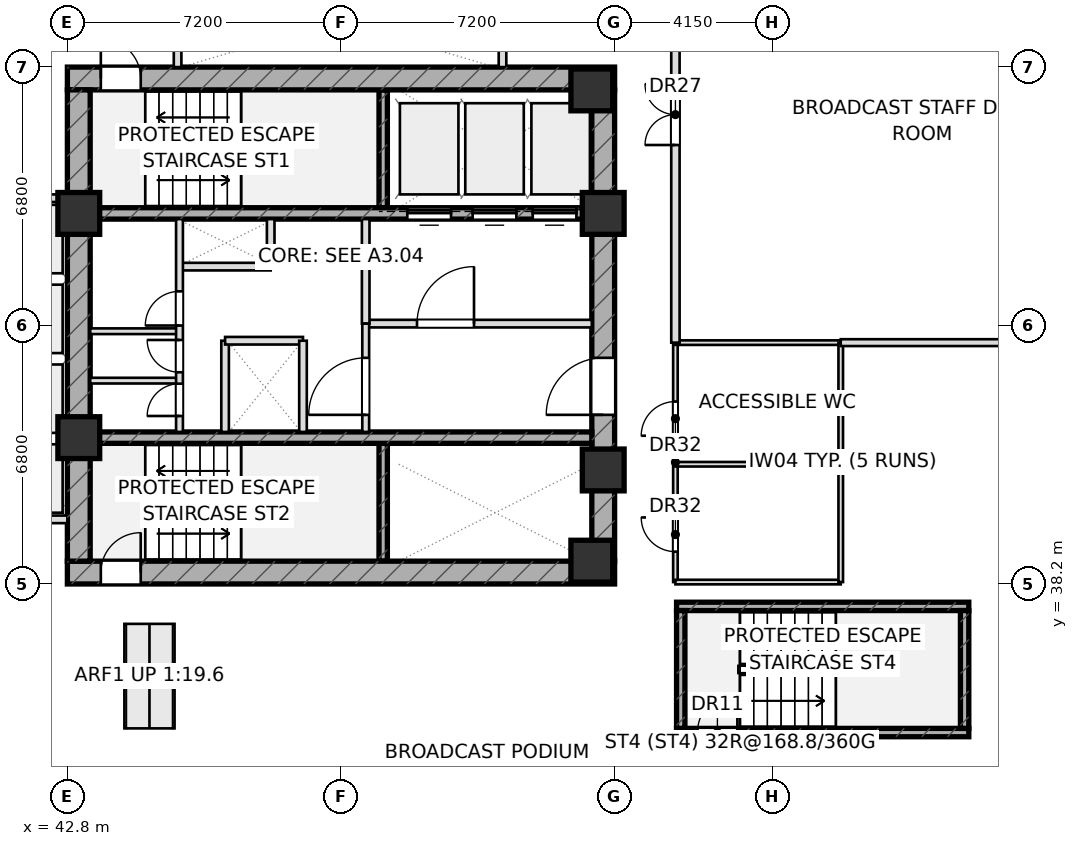
"""IFC4 building model, lengths in metres.
Left out: names, types, materials, properties, quantities, classifications, styles, units other than length and angle.
Written with IfcOpenShell. Run it as: python <this file> out.ifc"""

import sys

from ifc_helpers import new_model, si_unit, direction, frame, frame_2d, origin, origin_2d, place, context, subcontext, project, spatial, rectangle, extrude, element, fill, save


model = new_model("IFC4")
c1 = context("Model", 3, precision=1e-05, world=origin(), true_north=direction((0.0, 1.0)))
c2 = subcontext(c1, "Body", "Model", "MODEL_VIEW")
j1 = project(units=[si_unit("LENGTHUNIT", "METRE"), si_unit("PLANEANGLEUNIT", "RADIAN")], contexts=[c1])
p1 = place(None, origin())
s1 = spatial("IfcSite", under=j1, at=p1, CompositionType="ELEMENT")
p2 = place(p1, origin())
s2 = spatial("IfcBuilding", under=s1, at=p2, CompositionType="ELEMENT")
p3 = place(p2, frame((0.0, 0.0, 16.8)))
s3 = spatial("IfcBuildingStorey", under=s2, at=p3, CompositionType="ELEMENT", Elevation=16.8)
for number, where, z_axis, x_axis in (
    (1, (51.11, 48.1, 0.0), (0.0, 0.0, 1.0), (0.0, 1.0, 0.0)),
    (2, (51.11, 38.8, 0.0), (0.0, 0.0, 1.0), (0.0, 1.0, 0.0)),
):
    element("IfcWall", number, at=place(p3, frame(where, z_axis=z_axis, x_axis=x_axis)), inside=s3, PredefinedType="SHEAR", context=c2, shape_type="SweptSolid", body=[
        extrude(rectangle(XDim=3.1, YDim=0.22, at=frame_2d((1.55, 0.0))), origin(), (0.0, 0.0, 1.0), 4.95),
    ])
p4 = place(p3, frame((58.83, 34.29, 0.0), z_axis=(0.0, 0.0, 1.0), x_axis=(1.0, 0.0, 0.0)))
e3 = element("IfcWall", 3, at=p4, inside=s3, PredefinedType="SHEAR", context=c2, shape_type="SweptSolid", body=[
    extrude(rectangle(XDim=7.69, YDim=0.22, at=frame_2d((3.845, 0.0))), origin(), (0.0, 0.0, 1.0), 4.95),
])
p5 = place(p4, frame((0.55, 0.0, 0.0)))
e4 = element("IfcOpeningElement", 4, at=p5, cuts=e3, PredefinedType="OPENING", context=c2, shape_type="SweptSolid", body=[
    extrude(rectangle(XDim=1.05, YDim=2.2, at=frame_2d((0.525, 1.1))), frame((0.0, 0.12, 0.0), z_axis=(0.0, -1.0, 0.0), x_axis=(1.0, 0.0, 0.0)), (0.0, 0.0, 1.0), 0.24),
])
p6 = place(p3, frame((58.83, 37.61, 0.0), z_axis=(0.0, 0.0, 1.0), x_axis=(1.0, 0.0, 0.0)))
e5 = element("IfcWall", 5, at=p6, inside=s3, PredefinedType="SHEAR", context=c2, shape_type="SweptSolid", body=[
    extrude(rectangle(XDim=7.69, YDim=0.22, at=frame_2d((3.845, 0.0))), origin(), (0.0, 0.0, 1.0), 4.95),
])
for number, where, z_axis, x_axis in (
    (6, (66.41, 34.4, 0.0), (0.0, 0.0, 1.0), (0.0, 1.0, 0.0)),
    (7, (58.94, 34.4, 0.0), (0.0, 0.0, 1.0), (0.0, 1.0, 0.0)),
):
    element("IfcWall", number, at=place(p3, frame(where, z_axis=z_axis, x_axis=x_axis)), inside=s3, PredefinedType="SHEAR", context=c2, shape_type="SweptSolid", body=[
        extrude(rectangle(XDim=3.1, YDim=0.22, at=frame_2d((1.55, 0.0))), origin(), (0.0, 0.0, 1.0), 4.95),
    ])
p7 = place(p3, frame((42.8, 51.5, 0.0), z_axis=(0.0, 0.0, 1.0), x_axis=(1.0, 0.0, 0.0)))
e8 = element("IfcWall", 8, at=p7, inside=s3, PredefinedType="SHEAR", context=c2, shape_type="SweptSolid", body=[
    extrude(rectangle(XDim=14.4, YDim=0.6, at=frame_2d((7.2, 0.0))), origin(), (0.0, 0.0, 1.0), 4.95),
])
p8 = place(p7, frame((0.88, 0.0, 0.0)))
e9 = element("IfcOpeningElement", 9, at=p8, cuts=e8, PredefinedType="OPENING", context=c2, shape_type="SweptSolid", body=[
    extrude(rectangle(XDim=1.05, YDim=2.2, at=frame_2d((0.525, 1.1))), frame((0.0, 0.31, 0.0), z_axis=(0.0, -1.0, 0.0), x_axis=(1.0, 0.0, 0.0)), (0.0, 0.0, 1.0), 0.62),
])
p9 = place(p3, frame((42.8, 38.5, 0.0), z_axis=(0.0, 0.0, 1.0), x_axis=(1.0, 0.0, 0.0)))
e10 = element("IfcWall", 10, at=p9, inside=s3, PredefinedType="SHEAR", context=c2, shape_type="SweptSolid", body=[
    extrude(rectangle(XDim=14.4, YDim=0.6, at=frame_2d((7.2, 0.0))), origin(), (0.0, 0.0, 1.0), 4.95),
])
p10 = place(p9, frame((0.88, 0.0, 0.0)))
e11 = element("IfcOpeningElement", 11, at=p10, cuts=e10, PredefinedType="OPENING", context=c2, shape_type="SweptSolid", body=[
    extrude(rectangle(XDim=1.05, YDim=2.2, at=frame_2d((0.525, 1.1))), frame((0.0, 0.31, 0.0), z_axis=(0.0, -1.0, 0.0), x_axis=(1.0, 0.0, 0.0)), (0.0, 0.0, 1.0), 0.62),
])
p11 = place(p3, frame((43.1, 38.8, 0.0), z_axis=(0.0, 0.0, 1.0), x_axis=(0.0, 1.0, 0.0)))
e12 = element("IfcWall", 12, at=p11, inside=s3, PredefinedType="SHEAR", context=c2, shape_type="SweptSolid", body=[
    extrude(rectangle(XDim=12.4, YDim=0.6, at=frame_2d((6.2, 0.0))), origin(), (0.0, 0.0, 1.0), 4.95),
])
p12 = place(p3, frame((56.9, 38.8, 0.0), z_axis=(0.0, 0.0, 1.0), x_axis=(0.0, 1.0, 0.0)))
e13 = element("IfcWall", 13, at=p12, inside=s3, PredefinedType="SHEAR", context=c2, shape_type="SweptSolid", body=[
    extrude(rectangle(XDim=12.4, YDim=0.6, at=frame_2d((6.2, 0.0))), origin(), (0.0, 0.0, 1.0), 4.95),
])
p13 = place(p12, frame((3.85, 0.0, 0.0)))
e14 = element("IfcOpeningElement", 14, at=p13, cuts=e13, PredefinedType="OPENING", context=c2, shape_type="SweptSolid", body=[
    extrude(rectangle(XDim=1.5, YDim=2.2, at=frame_2d((0.75, 1.1))), frame((0.0, 0.31, 0.0), z_axis=(0.0, -1.0, 0.0), x_axis=(1.0, 0.0, 0.0)), (0.0, 0.0, 1.0), 0.62),
])
p14 = place(p3, frame((43.4, 47.95, 0.0), z_axis=(0.0, 0.0, 1.0), x_axis=(1.0, 0.0, 0.0)))
e15 = element("IfcWall", 15, at=p14, inside=s3, PredefinedType="SHEAR", context=c2, shape_type="SweptSolid", body=[
    extrude(rectangle(XDim=13.2, YDim=0.3, at=frame_2d((6.6, 0.0))), origin(), (0.0, 0.0, 1.0), 4.95),
])
p15 = place(p14, frame((8.345, 0.0, 0.0)))
e16 = element("IfcOpeningElement", 16, at=p15, cuts=e15, PredefinedType="OPENING", context=c2, shape_type="SweptSolid", body=[
    extrude(rectangle(XDim=1.15, YDim=2.2, at=frame_2d((0.575, 1.1))), frame((0.0, 0.16, 0.0), z_axis=(0.0, -1.0, 0.0), x_axis=(1.0, 0.0, 0.0)), (0.0, 0.0, 1.0), 0.32),
])
p16 = place(p14, frame((10.065, 0.0, 0.0)))
e17 = element("IfcOpeningElement", 17, at=p16, cuts=e15, PredefinedType="OPENING", context=c2, shape_type="SweptSolid", body=[
    extrude(rectangle(XDim=1.15, YDim=2.2, at=frame_2d((0.575, 1.1))), frame((0.0, 0.16, 0.0), z_axis=(0.0, -1.0, 0.0), x_axis=(1.0, 0.0, 0.0)), (0.0, 0.0, 1.0), 0.32),
])
p17 = place(p14, frame((11.645, 0.0, 0.0)))
e18 = element("IfcOpeningElement", 18, at=p17, cuts=e15, PredefinedType="OPENING", context=c2, shape_type="SweptSolid", body=[
    extrude(rectangle(XDim=1.15, YDim=2.2, at=frame_2d((0.575, 1.1))), frame((0.0, 0.16, 0.0), z_axis=(0.0, -1.0, 0.0), x_axis=(1.0, 0.0, 0.0)), (0.0, 0.0, 1.0), 0.32),
])
p18 = place(p3, frame((43.4, 42.05, 0.0), z_axis=(0.0, 0.0, 1.0), x_axis=(1.0, 0.0, 0.0)))
e19 = element("IfcWall", 19, at=p18, inside=s3, PredefinedType="SHEAR", context=c2, shape_type="SweptSolid", body=[
    extrude(rectangle(XDim=13.2, YDim=0.3, at=frame_2d((6.6, 0.0))), origin(), (0.0, 0.0, 1.0), 4.95),
])
for number, where, z_axis, x_axis in (
    (20, (43.1, 47.95, 0.0), (0.0, 0.0, 1.0), (1.0, 0.0, 0.0)),
    (21, (56.9, 47.95, 0.0), (0.0, 0.0, 1.0), (1.0, 0.0, 0.0)),
    (22, (56.6, 51.2, 0.0), (0.0, 0.0, 1.0), (1.0, 0.0, 0.0)),
    (23, (43.1, 42.05, 0.0), (0.0, 0.0, 1.0), (1.0, 0.0, 0.0)),
    (24, (56.9, 41.2, 0.0), (0.0, 0.0, 1.0), (1.0, 0.0, 0.0)),
    (25, (56.6, 38.8, 0.0), (0.0, 0.0, 1.0), (1.0, 0.0, 0.0)),
):
    element("IfcColumn", number, at=place(p3, frame(where, z_axis=z_axis, x_axis=x_axis)), inside=s3, PredefinedType="COLUMN", context=c2, shape_type="SweptSolid", body=[
        extrude(rectangle(XDim=1.1, YDim=1.1, at=origin_2d()), origin(), (0.0, 0.0, 1.0), 4.95),
    ])
for number, where, z_axis, x_axis in (
    (26, (40.3, 39.9, 0.0), (0.0, 0.0, 1.0), (1.0, 0.0, 0.0)),
    (27, (40.3, 48.35, 0.0), (0.0, 0.0, 1.0), (1.0, 0.0, 0.0)),
    (28, (45.7, 51.8, 0.0), (0.0, 0.0, 1.0), (0.0, 1.0, 0.0)),
    (29, (54.25, 51.8, 0.0), (0.0, 0.0, 1.0), (0.0, 1.0, 0.0)),
):
    element("IfcWall", number, at=place(p3, frame(where, z_axis=z_axis, x_axis=x_axis)), inside=s3, PredefinedType="PARTITIONING", context=c2, shape_type="SweptSolid", body=[
        extrude(rectangle(XDim=2.5, YDim=0.2, at=frame_2d((1.25, 0.0))), origin(), (0.0, 0.0, 1.0), 4.95),
    ])
p19 = place(p3, frame((45.75, 46.55, 0.0), z_axis=(0.0, 0.0, 1.0), x_axis=(1.0, 0.0, 0.0)))
e30 = element("IfcWall", 30, at=p19, inside=s3, PredefinedType="PARTITIONING", context=c2, shape_type="SweptSolid", body=[
    extrude(rectangle(XDim=2.4, YDim=0.2, at=frame_2d((1.2, 0.0))), origin(), (0.0, 0.0, 1.0), 4.95),
])
p20 = place(p3, frame((48.15, 46.55, 0.0), z_axis=(0.0, 0.0, 1.0), x_axis=(0.0, 1.0, 0.0)))
e31 = element("IfcWall", 31, at=p20, inside=s3, PredefinedType="PARTITIONING", context=c2, shape_type="SweptSolid", body=[
    extrude(rectangle(XDim=1.25, YDim=0.2, at=frame_2d((0.625, 0.0))), origin(), (0.0, 0.0, 1.0), 4.95),
])
p21 = place(p3, frame((46.95, 42.2, 0.0), z_axis=(0.0, 0.0, 1.0), x_axis=(0.0, 1.0, 0.0)))
e32 = element("IfcWall", 32, at=p21, inside=s3, PredefinedType="PARTITIONING", context=c2, shape_type="SweptSolid", body=[
    extrude(rectangle(XDim=2.4, YDim=0.2, at=frame_2d((1.2, 0.0))), origin(), (0.0, 0.0, 1.0), 4.95),
])
p22 = place(p3, frame((46.95, 44.6, 0.0), z_axis=(0.0, 0.0, 1.0), x_axis=(1.0, 0.0, 0.0)))
e33 = element("IfcWall", 33, at=p22, inside=s3, PredefinedType="PARTITIONING", context=c2, shape_type="SweptSolid", body=[
    extrude(rectangle(XDim=2.05, YDim=0.2, at=frame_2d((1.025, 0.0))), origin(), (0.0, 0.0, 1.0), 4.95),
])
p23 = place(p3, frame((50.65, 45.05, 0.0), z_axis=(0.0, 0.0, 1.0), x_axis=(1.0, 0.0, 0.0)))
e34 = element("IfcWall", 34, at=p23, inside=s3, PredefinedType="PARTITIONING", context=c2, shape_type="SweptSolid", body=[
    extrude(rectangle(XDim=5.95, YDim=0.2, at=frame_2d((2.975, 0.0))), origin(), (0.0, 0.0, 1.0), 4.95),
])
p24 = place(p23, frame((1.35, 0.0, 0.0)))
e35 = element("IfcOpeningElement", 35, at=p24, cuts=e34, PredefinedType="OPENING", context=c2, shape_type="SweptSolid", body=[
    extrude(rectangle(XDim=1.5, YDim=2.2, at=frame_2d((0.75, 1.1))), frame((0.0, 0.11, 0.0), z_axis=(0.0, -1.0, 0.0), x_axis=(1.0, 0.0, 0.0)), (0.0, 0.0, 1.0), 0.22),
])
p25 = place(p3, frame((50.65, 45.05, 0.0), z_axis=(0.0, 0.0, 1.0), x_axis=(0.0, 1.0, 0.0)))
e36 = element("IfcWall", 36, at=p25, inside=s3, PredefinedType="PARTITIONING", context=c2, shape_type="SweptSolid", body=[
    extrude(rectangle(XDim=2.75, YDim=0.2, at=frame_2d((1.375, 0.0))), origin(), (0.0, 0.0, 1.0), 4.95),
])
p26 = place(p3, frame((50.65, 42.2, 0.0), z_axis=(0.0, 0.0, 1.0), x_axis=(0.0, 1.0, 0.0)))
e37 = element("IfcWall", 37, at=p26, inside=s3, PredefinedType="PARTITIONING", context=c2, shape_type="SweptSolid", body=[
    extrude(rectangle(XDim=2.85, YDim=0.18, at=frame_2d((1.425, 0.0))), origin(), (0.0, 0.0, 1.0), 4.95),
])
p27 = place(p26, frame((0.45, 0.0, 0.0)))
e38 = element("IfcOpeningElement", 38, at=p27, cuts=e37, PredefinedType="OPENING", context=c2, shape_type="SweptSolid", body=[
    extrude(rectangle(XDim=1.5, YDim=2.2, at=frame_2d((0.75, 1.1))), frame((0.0, 0.1, 0.0), z_axis=(0.0, -1.0, 0.0), x_axis=(1.0, 0.0, 0.0)), (0.0, 0.0, 1.0), 0.2),
])
for number, where, z_axis, x_axis in (
    (39, (43.4, 43.55, 0.0), (0.0, 0.0, 1.0), (1.0, 0.0, 0.0)),
    (40, (43.4, 44.85, 0.0), (0.0, 0.0, 1.0), (1.0, 0.0, 0.0)),
):
    element("IfcWall", number, at=place(p3, frame(where, z_axis=z_axis, x_axis=x_axis)), inside=s3, PredefinedType="PARTITIONING", context=c2, shape_type="SweptSolid", body=[
        extrude(rectangle(XDim=2.35, YDim=0.15, at=frame_2d((1.175, 0.0))), origin(), (0.0, 0.0, 1.0), 4.95),
    ])
p28 = place(p3, frame((45.75, 42.2, 0.0), z_axis=(0.0, 0.0, 1.0), x_axis=(0.0, 1.0, 0.0)))
e41 = element("IfcWall", 41, at=p28, inside=s3, PredefinedType="PARTITIONING", context=c2, shape_type="SweptSolid", body=[
    extrude(rectangle(XDim=5.6, YDim=0.18, at=frame_2d((2.8, 0.0))), origin(), (0.0, 0.0, 1.0), 4.95),
])
p29 = place(p28, frame((0.42, 0.0, 0.0)))
e42 = element("IfcOpeningElement", 42, at=p29, cuts=e41, PredefinedType="OPENING", context=c2, shape_type="SweptSolid", body=[
    extrude(rectangle(XDim=0.85, YDim=2.05, at=frame_2d((0.425, 1.025))), frame((0.0, 0.1, 0.0), z_axis=(0.0, -1.0, 0.0), x_axis=(1.0, 0.0, 0.0)), (0.0, 0.0, 1.0), 0.2),
])
p30 = place(p28, frame((1.57, 0.0, 0.0)))
e43 = element("IfcOpeningElement", 43, at=p30, cuts=e41, PredefinedType="OPENING", context=c2, shape_type="SweptSolid", body=[
    extrude(rectangle(XDim=0.85, YDim=2.05, at=frame_2d((0.425, 1.025))), frame((0.0, 0.1, 0.0), z_axis=(0.0, -1.0, 0.0), x_axis=(1.0, 0.0, 0.0)), (0.0, 0.0, 1.0), 0.2),
])
p31 = place(p28, frame((2.8, 0.0, 0.0)))
e44 = element("IfcOpeningElement", 44, at=p31, cuts=e41, PredefinedType="OPENING", context=c2, shape_type="SweptSolid", body=[
    extrude(rectangle(XDim=0.9, YDim=2.05, at=frame_2d((0.45, 1.025))), frame((0.0, 0.1, 0.0), z_axis=(0.0, -1.0, 0.0), x_axis=(1.0, 0.0, 0.0)), (0.0, 0.0, 1.0), 0.2),
])
p32 = place(p3, frame((58.8, 38.25, 0.0), z_axis=(0.0, 0.0, 1.0), x_axis=(0.0, 1.0, 0.0)))
e45 = element("IfcWall", 45, at=p32, inside=s3, PredefinedType="PARTITIONING", context=c2, shape_type="SweptSolid", body=[
    extrude(rectangle(XDim=6.3, YDim=0.12, at=frame_2d((3.15, 0.0))), origin(), (0.0, 0.0, 1.0), 4.95),
])
p33 = place(p32, frame((0.8, 0.0, 0.0)))
e46 = element("IfcOpeningElement", 46, at=p33, cuts=e45, PredefinedType="OPENING", context=c2, shape_type="SweptSolid", body=[
    extrude(rectangle(XDim=0.9, YDim=2.05, at=frame_2d((0.45, 1.025))), frame((0.0, 0.07, 0.0), z_axis=(0.0, -1.0, 0.0), x_axis=(1.0, 0.0, 0.0)), (0.0, 0.0, 1.0), 0.14),
])
p34 = place(p32, frame((3.85, 0.0, 0.0)))
e47 = element("IfcOpeningElement", 47, at=p34, cuts=e45, PredefinedType="OPENING", context=c2, shape_type="SweptSolid", body=[
    extrude(rectangle(XDim=0.9, YDim=2.05, at=frame_2d((0.45, 1.025))), frame((0.0, 0.07, 0.0), z_axis=(0.0, -1.0, 0.0), x_axis=(1.0, 0.0, 0.0)), (0.0, 0.0, 1.0), 0.14),
])
for number, where, z_axis, x_axis in (
    (48, (58.8, 38.25, 0.0), (0.0, 0.0, 1.0), (1.0, 0.0, 0.0)),
    (49, (58.8, 41.35, 0.0), (0.0, 0.0, 1.0), (1.0, 0.0, 0.0)),
    (50, (58.8, 44.55, 0.0), (0.0, 0.0, 1.0), (1.0, 0.0, 0.0)),
):
    element("IfcWall", number, at=place(p3, frame(where, z_axis=z_axis, x_axis=x_axis)), inside=s3, PredefinedType="PARTITIONING", context=c2, shape_type="SweptSolid", body=[
        extrude(rectangle(XDim=4.35, YDim=0.12, at=frame_2d((2.175, 0.0))), origin(), (0.0, 0.0, 1.0), 4.95),
    ])
p35 = place(p3, frame((63.15, 38.25, 0.0), z_axis=(0.0, 0.0, 1.0), x_axis=(0.0, 1.0, 0.0)))
e51 = element("IfcWall", 51, at=p35, inside=s3, PredefinedType="PARTITIONING", context=c2, shape_type="SweptSolid", body=[
    extrude(rectangle(XDim=6.3, YDim=0.12, at=frame_2d((3.15, 0.0))), origin(), (0.0, 0.0, 1.0), 4.95),
])
p36 = place(p3, frame((58.8, 44.55, 0.0), z_axis=(0.0, 0.0, 1.0), x_axis=(0.0, 1.0, 0.0)))
e52 = element("IfcWall", 52, at=p36, inside=s3, PredefinedType="PARTITIONING", context=c2, shape_type="SweptSolid", body=[
    extrude(rectangle(XDim=11.55, YDim=0.22, at=frame_2d((5.775, 0.0))), origin(), (0.0, 0.0, 1.0), 4.025),
])
p37 = place(p36, frame((5.2, 0.0, 0.0)))
e53 = element("IfcOpeningElement", 53, at=p37, cuts=e52, PredefinedType="OPENING", context=c2, shape_type="SweptSolid", body=[
    extrude(rectangle(XDim=1.6, YDim=2.3, at=frame_2d((0.8, 1.15))), frame((0.0, 0.12, 0.0), z_axis=(0.0, -1.0, 0.0), x_axis=(1.0, 0.0, 0.0)), (0.0, 0.0, 1.0), 0.24),
])
p38 = place(p3, frame((63.15, 44.55, 0.0), z_axis=(0.0, 0.0, 1.0), x_axis=(1.0, 0.0, 0.0)))
e54 = element("IfcWall", 54, at=p38, inside=s3, PredefinedType="PARTITIONING", context=c2, shape_type="SweptSolid", body=[
    extrude(rectangle(XDim=15.33, YDim=0.18, at=frame_2d((7.665, 0.0))), origin(), (0.0, 0.0, 1.0), 4.95),
])
p39 = place(p3, frame((49.0, 42.2, 0.0), z_axis=(0.0, 0.0, 1.0), x_axis=(0.0, 1.0, 0.0)))
e55 = element("IfcWall", 55, at=p39, inside=s3, PredefinedType="PARTITIONING", context=c2, shape_type="SweptSolid", body=[
    extrude(rectangle(XDim=2.4, YDim=0.2, at=frame_2d((1.2, 0.0))), origin(), (0.0, 0.0, 1.0), 4.95),
])
p40 = place(p8, origin())
e56 = element("IfcDoor", 56, at=p40, inside=s3, OperationType="SINGLE_SWING_LEFT", PredefinedType="DOOR", context=c2, shape_type="SweptSolid", body=[
    extrude(rectangle(XDim=1.05, YDim=2.2, at=frame_2d((0.525, 1.1))), frame((0.0, 0.025, 0.0), z_axis=(0.0, -1.0, 0.0), x_axis=(1.0, 0.0, 0.0)), (0.0, 0.0, 1.0), 0.05),
])
fill(e9, e56)
p41 = place(p10, origin())
e57 = element("IfcDoor", 57, at=p41, inside=s3, OperationType="SINGLE_SWING_RIGHT", PredefinedType="DOOR", context=c2, shape_type="SweptSolid", body=[
    extrude(rectangle(XDim=1.05, YDim=2.2, at=frame_2d((0.525, 1.1))), frame((0.0, 0.025, 0.0), z_axis=(0.0, -1.0, 0.0), x_axis=(1.0, 0.0, 0.0)), (0.0, 0.0, 1.0), 0.05),
])
fill(e11, e57)
p42 = place(p13, origin())
e58 = element("IfcDoor", 58, at=p42, inside=s3, OperationType="SINGLE_SWING_LEFT", PredefinedType="DOOR", context=c2, shape_type="SweptSolid", body=[
    extrude(rectangle(XDim=1.5, YDim=2.2, at=frame_2d((0.75, 1.1))), frame((0.0, 0.025, 0.0), z_axis=(0.0, -1.0, 0.0), x_axis=(1.0, 0.0, 0.0)), (0.0, 0.0, 1.0), 0.05),
])
fill(e14, e58)
p43 = place(p24, origin())
e59 = element("IfcDoor", 59, at=p43, inside=s3, OperationType="SINGLE_SWING_RIGHT", PredefinedType="DOOR", context=c2, shape_type="SweptSolid", body=[
    extrude(rectangle(XDim=1.5, YDim=2.2, at=frame_2d((0.75, 1.1))), frame((0.0, 0.025, 0.0), z_axis=(0.0, -1.0, 0.0), x_axis=(1.0, 0.0, 0.0)), (0.0, 0.0, 1.0), 0.05),
])
fill(e35, e59)
p44 = place(p5, origin())
e60 = element("IfcDoor", 60, at=p44, inside=s3, OperationType="SINGLE_SWING_RIGHT", PredefinedType="DOOR", context=c2, shape_type="SweptSolid", body=[
    extrude(rectangle(XDim=1.05, YDim=2.2, at=frame_2d((0.525, 1.1))), frame((0.0, 0.025, 0.0), z_axis=(0.0, -1.0, 0.0), x_axis=(1.0, 0.0, 0.0)), (0.0, 0.0, 1.0), 0.05),
])
fill(e4, e60)
p45 = place(p27, origin())
e61 = element("IfcDoor", 61, at=p45, inside=s3, OperationType="SINGLE_SWING_LEFT", PredefinedType="DOOR", context=c2, shape_type="SweptSolid", body=[
    extrude(rectangle(XDim=1.5, YDim=2.2, at=frame_2d((0.75, 1.1))), frame((0.0, 0.025, 0.0), z_axis=(0.0, -1.0, 0.0), x_axis=(1.0, 0.0, 0.0)), (0.0, 0.0, 1.0), 0.05),
])
fill(e38, e61)
p46 = place(p29, origin())
e62 = element("IfcDoor", 62, at=p46, inside=s3, OperationType="SINGLE_SWING_LEFT", PredefinedType="DOOR", context=c2, shape_type="SweptSolid", body=[
    extrude(rectangle(XDim=0.85, YDim=2.05, at=frame_2d((0.425, 1.025))), frame((0.0, 0.025, 0.0), z_axis=(0.0, -1.0, 0.0), x_axis=(1.0, 0.0, 0.0)), (0.0, 0.0, 1.0), 0.05),
])
fill(e42, e62)
p47 = place(p30, origin())
e63 = element("IfcDoor", 63, at=p47, inside=s3, OperationType="SINGLE_SWING_RIGHT", PredefinedType="DOOR", context=c2, shape_type="SweptSolid", body=[
    extrude(rectangle(XDim=0.85, YDim=2.05, at=frame_2d((0.425, 1.025))), frame((0.0, 0.025, 0.0), z_axis=(0.0, -1.0, 0.0), x_axis=(1.0, 0.0, 0.0)), (0.0, 0.0, 1.0), 0.05),
])
fill(e43, e63)
p48 = place(p31, origin())
e64 = element("IfcDoor", 64, at=p48, inside=s3, OperationType="SINGLE_SWING_LEFT", PredefinedType="DOOR", context=c2, shape_type="SweptSolid", body=[
    extrude(rectangle(XDim=0.9, YDim=2.05, at=frame_2d((0.45, 1.025))), frame((0.0, 0.025, 0.0), z_axis=(0.0, -1.0, 0.0), x_axis=(1.0, 0.0, 0.0)), (0.0, 0.0, 1.0), 0.05),
])
fill(e44, e64)
p49 = place(p33, origin())
e65 = element("IfcDoor", 65, at=p49, inside=s3, OperationType="SINGLE_SWING_RIGHT", PredefinedType="DOOR", context=c2, shape_type="SweptSolid", body=[
    extrude(rectangle(XDim=0.9, YDim=2.05, at=frame_2d((0.45, 1.025))), frame((0.0, 0.025, 0.0), z_axis=(0.0, -1.0, 0.0), x_axis=(1.0, 0.0, 0.0)), (0.0, 0.0, 1.0), 0.05),
])
fill(e46, e65)
p50 = place(p34, origin())
e66 = element("IfcDoor", 66, at=p50, inside=s3, OperationType="SINGLE_SWING_LEFT", PredefinedType="DOOR", context=c2, shape_type="SweptSolid", body=[
    extrude(rectangle(XDim=0.9, YDim=2.05, at=frame_2d((0.45, 1.025))), frame((0.0, 0.025, 0.0), z_axis=(0.0, -1.0, 0.0), x_axis=(1.0, 0.0, 0.0)), (0.0, 0.0, 1.0), 0.05),
])
fill(e47, e66)
p51 = place(p37, origin())
e67 = element("IfcDoor", 67, at=p51, inside=s3, OperationType="DOUBLE_DOOR_SINGLE_SWING", PredefinedType="DOOR", context=c2, shape_type="SweptSolid", body=[
    extrude(rectangle(XDim=1.6, YDim=2.3, at=frame_2d((0.8, 1.15))), frame((0.0, 0.025, 0.0), z_axis=(0.0, -1.0, 0.0), x_axis=(1.0, 0.0, 0.0)), (0.0, 0.0, 1.0), 0.05),
])
fill(e53, e67)
p52 = place(p15, origin())
e68 = element("IfcDoor", 68, at=p52, inside=s3, OperationType="SLIDING_TO_LEFT", PredefinedType="DOOR", context=c2, shape_type="SweptSolid", body=[
    extrude(rectangle(XDim=1.15, YDim=2.2, at=frame_2d((0.575, 1.1))), frame((0.0, 0.025, 0.0), z_axis=(0.0, -1.0, 0.0), x_axis=(1.0, 0.0, 0.0)), (0.0, 0.0, 1.0), 0.05),
])
fill(e16, e68)
p53 = place(p16, origin())
e69 = element("IfcDoor", 69, at=p53, inside=s3, OperationType="SLIDING_TO_LEFT", PredefinedType="DOOR", context=c2, shape_type="SweptSolid", body=[
    extrude(rectangle(XDim=1.15, YDim=2.2, at=frame_2d((0.575, 1.1))), frame((0.0, 0.025, 0.0), z_axis=(0.0, -1.0, 0.0), x_axis=(1.0, 0.0, 0.0)), (0.0, 0.0, 1.0), 0.05),
])
fill(e17, e69)
p54 = place(p17, origin())
e70 = element("IfcDoor", 70, at=p54, inside=s3, OperationType="SLIDING_TO_LEFT", PredefinedType="DOOR", context=c2, shape_type="SweptSolid", body=[
    extrude(rectangle(XDim=1.15, YDim=2.2, at=frame_2d((0.575, 1.1))), frame((0.0, 0.025, 0.0), z_axis=(0.0, -1.0, 0.0), x_axis=(1.0, 0.0, 0.0)), (0.0, 0.0, 1.0), 0.05),
])
fill(e18, e70)
save(model, sys.argv[1])
